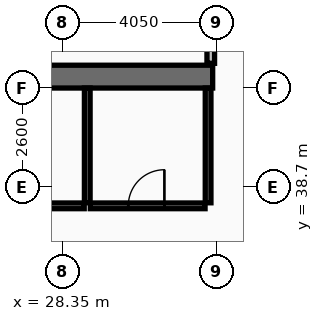
"""IFC4 building model, lengths in metres.
Left out: names, types, materials, properties, quantities, classifications, styles, units other than length and angle.
Written with IfcOpenShell. Run it as: python <this file> out.ifc"""

import sys

from ifc_helpers import new_model, si_unit, direction, frame, frame_2d, origin, place, context, subcontext, project, spatial, rectangle, extrude, element, fill, save


model = new_model("IFC4")
c1 = context("Model", 3, precision=1e-05, world=origin(), true_north=direction((0.0, 1.0)))
c2 = subcontext(c1, "Body", "Model", "MODEL_VIEW")
j1 = project(units=[si_unit("LENGTHUNIT", "METRE"), si_unit("PLANEANGLEUNIT", "RADIAN")], contexts=[c1])
p1 = place(None, origin())
s1 = spatial("IfcSite", under=j1, at=p1, CompositionType="ELEMENT")
p2 = place(p1, origin())
s2 = spatial("IfcBuilding", under=s1, at=p2, CompositionType="ELEMENT")
p3 = place(p2, frame((0.0, 0.0, 265.4)))
s3 = spatial("IfcBuildingStorey", under=s2, at=p3, CompositionType="ELEMENT", Elevation=265.4)
p4 = place(p3, frame((32.3, 41.6, 0.0), z_axis=(0.0, 0.0, 1.0), x_axis=(-1.0, 0.0, 0.0)))
e1 = element("IfcWall", 1, at=p4, inside=s3, PredefinedType="SHEAR", context=c2, shape_type="SweptSolid", body=[
    extrude(rectangle(XDim=11.45, YDim=0.6, at=frame_2d((5.725, 0.0))), origin(), (0.0, 0.0, 1.0), 4.24),
])
p5 = place(p3, frame((32.25, 41.95, 0.0), z_axis=(0.0, 0.0, 1.0), x_axis=(0.0, 1.0, 0.0)))
e2 = element("IfcWall", 2, at=p5, inside=s3, PredefinedType="PARTITIONING", context=c2, shape_type="SweptSolid", body=[
    extrude(rectangle(XDim=2.295, YDim=0.2, at=frame_2d((1.147, 0.0))), origin(), (0.0, 0.0, 1.0), 4.24),
])
p6 = place(p3, frame((24.88, 38.2, 0.0), z_axis=(0.0, 0.0, 1.0), x_axis=(1.0, 0.0, 0.0)))
e3 = element("IfcWall", 3, at=p6, inside=s3, PredefinedType="PARTITIONING", context=c2, shape_type="SweptSolid", body=[
    extrude(rectangle(XDim=4.04, YDim=0.15, at=frame_2d((2.02, 0.0))), origin(), (0.0, 0.0, 1.0), 3.58),
])
p7 = place(p6, frame((1.3, 0.0, 0.0)))
e4 = element("IfcOpeningElement", 4, at=p7, cuts=e3, PredefinedType="OPENING", context=c2, shape_type="SweptSolid", body=[
    extrude(rectangle(XDim=0.95, YDim=2.05, at=frame_2d((0.475, 1.025))), frame((0.0, 0.085, 0.0), z_axis=(0.0, -1.0, 0.0), x_axis=(1.0, 0.0, 0.0)), (0.0, 0.0, 1.0), 0.17),
])
p8 = place(p3, frame((29.08, 38.2, 0.0), z_axis=(0.0, 0.0, 1.0), x_axis=(1.0, 0.0, 0.0)))
e5 = element("IfcWall", 5, at=p8, inside=s3, PredefinedType="PARTITIONING", context=c2, shape_type="SweptSolid", body=[
    extrude(rectangle(XDim=3.02, YDim=0.15, at=frame_2d((1.51, 0.0))), origin(), (0.0, 0.0, 1.0), 3.58),
])
p9 = place(p8, frame((1.0, 0.0, 0.0)))
e6 = element("IfcOpeningElement", 6, at=p9, cuts=e5, PredefinedType="OPENING", context=c2, shape_type="SweptSolid", body=[
    extrude(rectangle(XDim=0.95, YDim=2.05, at=frame_2d((0.475, 1.025))), frame((0.0, 0.085, 0.0), z_axis=(0.0, -1.0, 0.0), x_axis=(1.0, 0.0, 0.0)), (0.0, 0.0, 1.0), 0.17),
])
for number, where, z_axis, x_axis in (
    (7, (29.0, 38.28, 0.0), (0.0, 0.0, 1.0), (0.0, 1.0, 0.0)),
    (8, (32.18, 38.28, 0.0), (0.0, 0.0, 1.0), (0.0, 1.0, 0.0)),
):
    element("IfcWall", number, at=place(p3, frame(where, z_axis=z_axis, x_axis=x_axis)), inside=s3, PredefinedType="PARTITIONING", context=c2, shape_type="SweptSolid", body=[
        extrude(rectangle(XDim=3.02, YDim=0.15, at=frame_2d((1.51, 0.0))), origin(), (0.0, 0.0, 1.0), 4.24),
    ])
p10 = place(p9, origin())
e9 = element("IfcDoor", 9, at=p10, inside=s3, OperationType="SINGLE_SWING_RIGHT", PredefinedType="DOOR", context=c2, shape_type="SweptSolid", body=[
    extrude(rectangle(XDim=0.95, YDim=2.05, at=frame_2d((0.475, 1.025))), frame((0.0, 0.025, 0.0), z_axis=(0.0, -1.0, 0.0), x_axis=(1.0, 0.0, 0.0)), (0.0, 0.0, 1.0), 0.05),
])
fill(e6, e9)
save(model, sys.argv[1])
